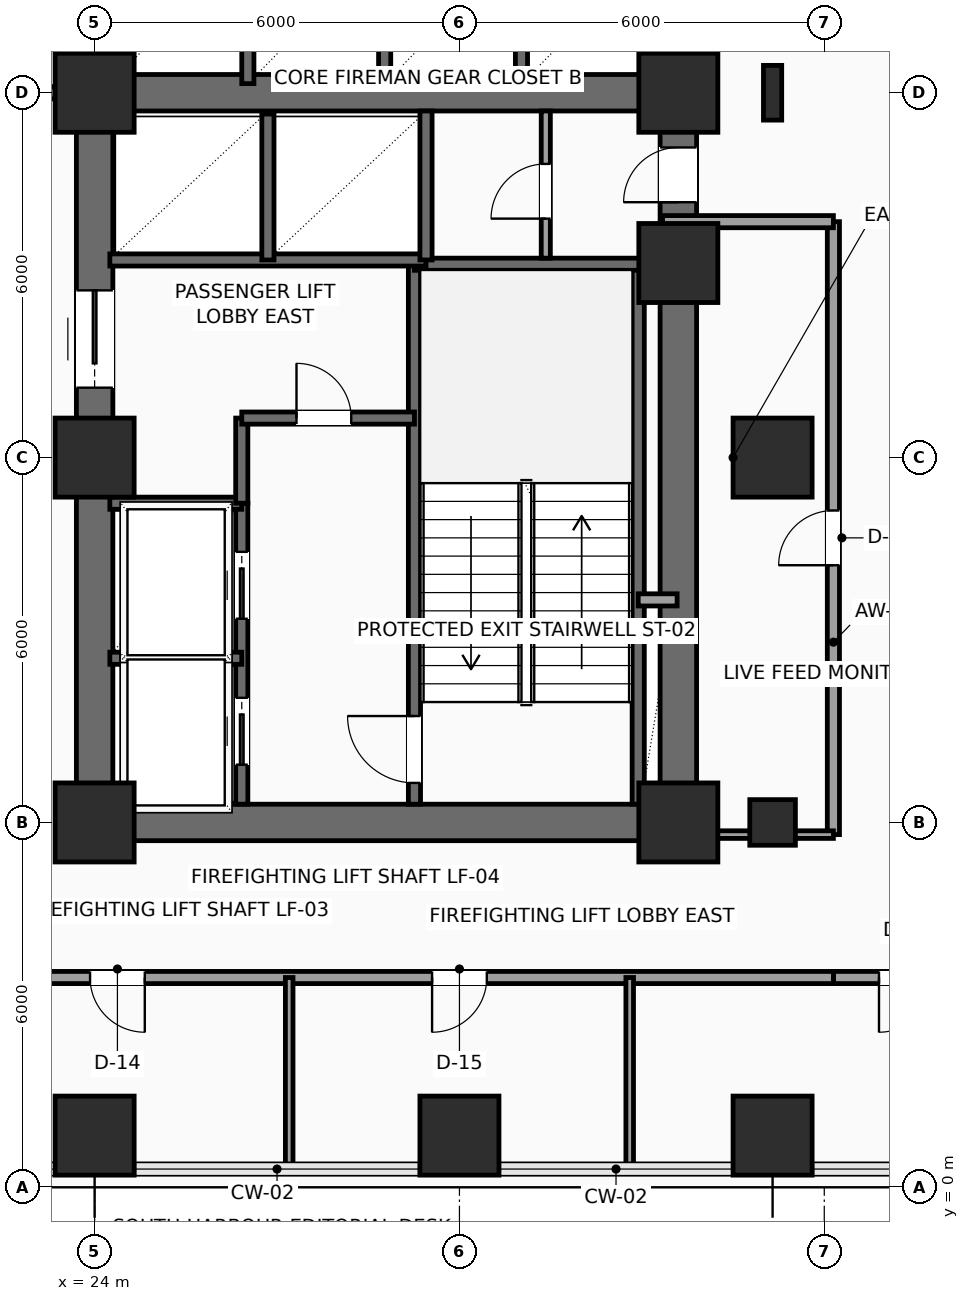
"""IFC4 building model, lengths in metres.
Left out: names, types, materials, properties, quantities, classifications, styles, units other than length and angle.
Written with IfcOpenShell. Run it as: python <this file> out.ifc"""

import sys

from ifc_helpers import new_model, si_unit, direction, frame, frame_2d, origin, origin_2d, place, context, subcontext, project, spatial, rectangle, hollow_rectangle, i_section, extrude, element, fill, save


model = new_model("IFC4")
c1 = context("Model", 3, precision=1e-05, world=origin(), true_north=direction((0.0, 1.0)))
c2 = subcontext(c1, "Body", "Model", "MODEL_VIEW")
j1 = project(units=[si_unit("LENGTHUNIT", "METRE"), si_unit("PLANEANGLEUNIT", "RADIAN")], contexts=[c1])
p1 = place(None, origin())
s1 = spatial("IfcSite", under=j1, at=p1, CompositionType="ELEMENT")
p2 = place(p1, origin())
s2 = spatial("IfcBuilding", under=s1, at=p2, CompositionType="ELEMENT")
p3 = place(p2, frame((0.0, 0.0, 51.9)))
s3 = spatial("IfcBuildingStorey", under=s2, at=p3, CompositionType="ELEMENT", Elevation=51.9)
for number, where, z_axis, x_axis in (
    (1, (24.0, 6.0, 0.0), (0.0, 0.0, 1.0), (1.0, 0.0, 0.0)),
    (2, (24.0, 12.0, 0.0), (0.0, 0.0, 1.0), (1.0, 0.0, 0.0)),
    (3, (24.0, 18.0, 0.0), (0.0, 0.0, 1.0), (1.0, 0.0, 0.0)),
    (4, (33.6, 6.0, 0.0), (0.0, 0.0, 1.0), (1.0, 0.0, 0.0)),
    (5, (33.6, 15.2, 0.0), (0.0, 0.0, 1.0), (1.0, 0.0, 0.0)),
    (6, (33.6, 18.0, 0.0), (0.0, 0.0, 1.0), (1.0, 0.0, 0.0)),
    (7, (24.0, 0.85, 0.0), (0.0, 0.0, 1.0), (1.0, 0.0, 0.0)),
    (8, (30.0, 0.85, 0.0), (0.0, 0.0, 1.0), (1.0, 0.0, 0.0)),
    (9, (35.15, 0.85, 0.0), (0.0, 0.0, 1.0), (1.0, 0.0, 0.0)),
):
    element("IfcColumn", number, at=place(p3, frame(where, z_axis=z_axis, x_axis=x_axis)), inside=s3, PredefinedType="COLUMN", context=c2, shape_type="SweptSolid", body=[
        extrude(rectangle(XDim=1.3, YDim=1.3, at=origin_2d()), origin(), (0.0, 0.0, 1.0), 3.9),
    ])
p4 = place(p3, frame((35.15, 6.0, 0.0), z_axis=(0.0, 0.0, 1.0), x_axis=(1.0, 0.0, 0.0)))
e10 = element("IfcColumn", 10, at=p4, inside=s3, PredefinedType="COLUMN", context=c2, shape_type="SweptSolid", body=[
    extrude(hollow_rectangle(XDim=0.75, YDim=0.75, WallThickness=0.035, InnerFilletRadius=0.035, OuterFilletRadius=0.05, at=origin_2d()), origin(), (0.0, 0.0, 1.0), 3.9),
])
p5 = place(p3, frame((35.15, 12.0, 0.0), z_axis=(0.0, 0.0, 1.0), x_axis=(1.0, 0.0, 0.0)))
e11 = element("IfcColumn", 11, at=p5, inside=s3, PredefinedType="COLUMN", context=c2, shape_type="SweptSolid", body=[
    extrude(rectangle(XDim=1.3, YDim=1.3, at=origin_2d()), origin(), (0.0, 0.0, 1.0), 3.9),
])
p6 = place(p3, frame((35.15, 18.0, 0.0), z_axis=(0.0, 0.0, 1.0), x_axis=(1.0, 0.0, 0.0)))
e12 = element("IfcColumn", 12, at=p6, inside=s3, PredefinedType="COLUMN", context=c2, shape_type="SweptSolid", body=[
    extrude(i_section(OverallWidth=0.3, OverallDepth=0.9, WebThickness=0.019, FlangeThickness=0.035, FilletRadius=0.03, at=origin_2d()), origin(), (0.0, 0.0, 1.0), 3.9),
])
for number, where, z_axis, x_axis in (
    (13, (24.0, 6.0, 0.0), (0.0, 0.0, 1.0), (1.0, 0.0, 0.0)),
    (14, (24.0, 18.0, 0.0), (0.0, 0.0, 1.0), (1.0, 0.0, 0.0)),
):
    element("IfcWall", number, at=place(p3, frame(where, z_axis=z_axis, x_axis=x_axis)), inside=s3, PredefinedType="SHEAR", context=c2, shape_type="SweptSolid", body=[
        extrude(rectangle(XDim=9.6, YDim=0.6, at=frame_2d((4.8, 0.0))), origin(), (0.0, 0.0, 1.0), 3.65),
    ])
p7 = place(p3, frame((24.0, 6.0, 0.0), z_axis=(0.0, 0.0, 1.0), x_axis=(0.0, 1.0, 0.0)))
e15 = element("IfcWall", 15, at=p7, inside=s3, PredefinedType="SHEAR", context=c2, shape_type="SweptSolid", body=[
    extrude(rectangle(XDim=12.0, YDim=0.6, at=frame_2d((6.0, 0.0))), origin(), (0.0, 0.0, 1.0), 3.65),
])
p8 = place(p7, frame((7.15, 0.0, 0.0)))
e16 = element("IfcOpeningElement", 16, at=p8, cuts=e15, PredefinedType="OPENING", context=c2, shape_type="SweptSolid", body=[
    extrude(rectangle(XDim=1.6, YDim=2.3, at=frame_2d((0.8, 1.15))), frame((0.0, 0.31, 0.0), z_axis=(0.0, -1.0, 0.0), x_axis=(1.0, 0.0, 0.0)), (0.0, 0.0, 1.0), 0.62),
])
p9 = place(p3, frame((33.6, 6.0, 0.0), z_axis=(0.0, 0.0, 1.0), x_axis=(0.0, 1.0, 0.0)))
e17 = element("IfcWall", 17, at=p9, inside=s3, PredefinedType="SHEAR", context=c2, shape_type="SweptSolid", body=[
    extrude(rectangle(XDim=12.0, YDim=0.6, at=frame_2d((6.0, 0.0))), origin(), (0.0, 0.0, 1.0), 3.65),
])
p10 = place(p9, frame((10.2, 0.0, 0.0)))
e18 = element("IfcOpeningElement", 18, at=p10, cuts=e17, PredefinedType="OPENING", context=c2, shape_type="SweptSolid", body=[
    extrude(rectangle(XDim=0.9, YDim=2.15, at=frame_2d((0.45, 1.075))), frame((0.0, 0.31, 0.0), z_axis=(0.0, -1.0, 0.0), x_axis=(1.0, 0.0, 0.0)), (0.0, 0.0, 1.0), 0.62),
])
p11 = place(p3, frame((29.26, 6.3, 0.0), z_axis=(0.0, 0.0, 1.0), x_axis=(0.0, 1.0, 0.0)))
e19 = element("IfcWall", 19, at=p11, inside=s3, PredefinedType="SHEAR", context=c2, shape_type="SweptSolid", body=[
    extrude(rectangle(XDim=8.88, YDim=0.2, at=frame_2d((4.44, 0.0))), origin(), (0.0, 0.0, 1.0), 3.65),
])
p12 = place(p11, frame((0.35, 0.0, 0.0)))
e20 = element("IfcOpeningElement", 20, at=p12, cuts=e19, PredefinedType="OPENING", context=c2, shape_type="SweptSolid", body=[
    extrude(rectangle(XDim=1.1, YDim=2.2, at=frame_2d((0.55, 1.1))), frame((0.0, 0.11, 0.0), z_axis=(0.0, -1.0, 0.0), x_axis=(1.0, 0.0, 0.0)), (0.0, 0.0, 1.0), 0.22),
])
p13 = place(p3, frame((32.94, 6.3, 0.0), z_axis=(0.0, 0.0, 1.0), x_axis=(0.0, 1.0, 0.0)))
e21 = element("IfcWall", 21, at=p13, inside=s3, PredefinedType="SHEAR", context=c2, shape_type="SweptSolid", body=[
    extrude(rectangle(XDim=8.88, YDim=0.2, at=frame_2d((4.44, 0.0))), origin(), (0.0, 0.0, 1.0), 3.65),
])
p14 = place(p3, frame((29.26, 15.18, 0.0), z_axis=(0.0, 0.0, 1.0), x_axis=(1.0, 0.0, 0.0)))
e22 = element("IfcWall", 22, at=p14, inside=s3, PredefinedType="SHEAR", context=c2, shape_type="SweptSolid", body=[
    extrude(rectangle(XDim=4.04, YDim=0.2, at=frame_2d((2.02, 0.0))), origin(), (0.0, 0.0, 1.0), 3.65),
])
p15 = place(p3, frame((26.42, 6.3, 0.0), z_axis=(0.0, 0.0, 1.0), x_axis=(0.0, 1.0, 0.0)))
e23 = element("IfcWall", 23, at=p15, inside=s3, PredefinedType="SHEAR", context=c2, shape_type="SweptSolid", body=[
    extrude(rectangle(XDim=4.95, YDim=0.2, at=frame_2d((2.475, 0.0))), origin(), (0.0, 0.0, 1.0), 3.65),
])
p16 = place(p15, frame((0.65, 0.0, 0.0)))
e24 = element("IfcOpeningElement", 24, at=p16, cuts=e23, PredefinedType="OPENING", context=c2, shape_type="SweptSolid", body=[
    extrude(rectangle(XDim=1.1, YDim=2.2, at=frame_2d((0.55, 1.1))), frame((0.0, 0.11, 0.0), z_axis=(0.0, -1.0, 0.0), x_axis=(1.0, 0.0, 0.0)), (0.0, 0.0, 1.0), 0.22),
])
p17 = place(p15, frame((3.05, 0.0, 0.0)))
e25 = element("IfcOpeningElement", 25, at=p17, cuts=e23, PredefinedType="OPENING", context=c2, shape_type="SweptSolid", body=[
    extrude(rectangle(XDim=1.1, YDim=2.2, at=frame_2d((0.55, 1.1))), frame((0.0, 0.11, 0.0), z_axis=(0.0, -1.0, 0.0), x_axis=(1.0, 0.0, 0.0)), (0.0, 0.0, 1.0), 0.22),
])
for number, where, z_axis, x_axis in (
    (26, (24.25, 8.7, 0.0), (0.0, 0.0, 1.0), (1.0, 0.0, 0.0)),
    (27, (24.25, 11.25, 0.0), (0.0, 0.0, 1.0), (1.0, 0.0, 0.0)),
):
    element("IfcWall", number, at=place(p3, frame(where, z_axis=z_axis, x_axis=x_axis)), inside=s3, PredefinedType="SHEAR", context=c2, shape_type="SweptSolid", body=[
        extrude(rectangle(XDim=2.17, YDim=0.2, at=frame_2d((1.085, 0.0))), origin(), (0.0, 0.0, 1.0), 3.65),
    ])
p18 = place(p3, frame((26.42, 11.25, 0.0), z_axis=(0.0, 0.0, 1.0), x_axis=(0.0, 1.0, 0.0)))
e28 = element("IfcWall", 28, at=p18, inside=s3, PredefinedType="SHEAR", context=c2, shape_type="SweptSolid", body=[
    extrude(rectangle(XDim=1.4, YDim=0.2, at=frame_2d((0.7, 0.0))), origin(), (0.0, 0.0, 1.0), 3.65),
])
p19 = place(p3, frame((26.42, 12.65, 0.0), z_axis=(0.0, 0.0, 1.0), x_axis=(1.0, 0.0, 0.0)))
e29 = element("IfcWall", 29, at=p19, inside=s3, PredefinedType="SHEAR", context=c2, shape_type="SweptSolid", body=[
    extrude(rectangle(XDim=2.84, YDim=0.2, at=frame_2d((1.42, 0.0))), origin(), (0.0, 0.0, 1.0), 3.65),
])
p20 = place(p19, frame((0.9, 0.0, 0.0)))
e30 = element("IfcOpeningElement", 30, at=p20, cuts=e29, PredefinedType="OPENING", context=c2, shape_type="SweptSolid", body=[
    extrude(rectangle(XDim=0.9, YDim=2.15, at=frame_2d((0.45, 1.075))), frame((0.0, 0.11, 0.0), z_axis=(0.0, -1.0, 0.0), x_axis=(1.0, 0.0, 0.0)), (0.0, 0.0, 1.0), 0.22),
])
p21 = place(p3, frame((32.94, 9.66, 0.0), z_axis=(0.0, 0.0, 1.0), x_axis=(1.0, 0.0, 0.0)))
e31 = element("IfcWall", 31, at=p21, inside=s3, PredefinedType="SOLIDWALL", context=c2, shape_type="SweptSolid", body=[
    extrude(rectangle(XDim=0.64, YDim=0.2, at=frame_2d((0.32, 0.0))), origin(), (0.0, 0.0, 1.0), 3.65),
])
p22 = place(p3, frame((24.25, 15.25, 0.0), z_axis=(0.0, 0.0, 1.0), x_axis=(1.0, 0.0, 0.0)))
e32 = element("IfcWall", 32, at=p22, inside=s3, PredefinedType="SHEAR", context=c2, shape_type="SweptSolid", body=[
    extrude(rectangle(XDim=5.2, YDim=0.2, at=frame_2d((2.6, 0.0))), origin(), (0.0, 0.0, 1.0), 3.65),
])
p23 = place(p3, frame((26.85, 15.25, 0.0), z_axis=(0.0, 0.0, 1.0), x_axis=(0.0, 1.0, 0.0)))
e33 = element("IfcWall", 33, at=p23, inside=s3, PredefinedType="SHEAR", context=c2, shape_type="SweptSolid", body=[
    extrude(rectangle(XDim=2.4, YDim=0.2, at=frame_2d((1.2, 0.0))), origin(), (0.0, 0.0, 1.0), 3.65),
])
p24 = place(p3, frame((29.45, 15.25, 0.0), z_axis=(0.0, 0.0, 1.0), x_axis=(0.0, 1.0, 0.0)))
e34 = element("IfcWall", 34, at=p24, inside=s3, PredefinedType="SHEAR", context=c2, shape_type="SweptSolid", body=[
    extrude(rectangle(XDim=2.45, YDim=0.2, at=frame_2d((1.225, 0.0))), origin(), (0.0, 0.0, 1.0), 3.65),
])
p25 = place(p3, frame((31.42, 15.28, 0.0), z_axis=(0.0, 0.0, 1.0), x_axis=(0.0, 1.0, 0.0)))
e35 = element("IfcWall", 35, at=p25, inside=s3, PredefinedType="PARTITIONING", context=c2, shape_type="SweptSolid", body=[
    extrude(rectangle(XDim=2.42, YDim=0.15, at=frame_2d((1.21, 0.0))), origin(), (0.0, 0.0, 1.0), 3.65),
])
p26 = place(p25, frame((0.65, 0.0, 0.0)))
e36 = element("IfcOpeningElement", 36, at=p26, cuts=e35, PredefinedType="OPENING", context=c2, shape_type="SweptSolid", body=[
    extrude(rectangle(XDim=0.9, YDim=2.15, at=frame_2d((0.45, 1.075))), frame((0.0, 0.085, 0.0), z_axis=(0.0, -1.0, 0.0), x_axis=(1.0, 0.0, 0.0)), (0.0, 0.0, 1.0), 0.17),
])
p27 = place(p3, frame((20.45, 18.0, 0.0), z_axis=(0.0, 0.0, 1.0), x_axis=(1.0, 0.0, 0.0)))
e37 = element("IfcWall", 37, at=p27, inside=s3, PredefinedType="SHEAR", context=c2, shape_type="SweptSolid", body=[
    extrude(rectangle(XDim=3.5, YDim=0.2, at=frame_2d((1.75, 0.0))), origin(), (0.0, 0.0, 1.0), 3.65),
])
p28 = place(p27, frame((0.95, 0.0, 0.0)))
e38 = element("IfcOpeningElement", 38, at=p28, cuts=e37, PredefinedType="OPENING", context=c2, shape_type="SweptSolid", body=[
    extrude(rectangle(XDim=1.6, YDim=2.3, at=frame_2d((0.8, 1.15))), frame((0.0, 0.11, 0.0), z_axis=(0.0, -1.0, 0.0), x_axis=(1.0, 0.0, 0.0)), (0.0, 0.0, 1.0), 0.22),
])
p29 = place(p3, frame((23.95, 18.0, 0.0), z_axis=(0.0, 0.0, 1.0), x_axis=(0.0, 1.0, 0.0)))
e39 = element("IfcWall", 39, at=p29, inside=s3, PredefinedType="SHEAR", context=c2, shape_type="SweptSolid", body=[
    extrude(rectangle(XDim=9.3, YDim=0.2, at=frame_2d((4.65, 0.0))), origin(), (0.0, 0.0, 1.0), 3.65),
])
for number, where, z_axis, x_axis in (
    (40, (33.3, 18.1, 0.0), (0.0, 0.0, 1.0), (0.0, 1.0, 0.0)),
    (41, (24.25, 18.1, 0.0), (0.0, 0.0, 1.0), (0.0, 1.0, 0.0)),
):
    element("IfcWall", number, at=place(p3, frame(where, z_axis=z_axis, x_axis=x_axis)), inside=s3, PredefinedType="SHEAR", context=c2, shape_type="SweptSolid", body=[
        extrude(rectangle(XDim=2.35, YDim=0.2, at=frame_2d((1.175, 0.0))), origin(), (0.0, 0.0, 1.0), 3.65),
    ])
for number, where, z_axis, x_axis in (
    (42, (26.52, 18.15, 0.0), (0.0, 0.0, 1.0), (0.0, 1.0, 0.0)),
    (43, (28.77, 18.15, 0.0), (0.0, 0.0, 1.0), (0.0, 1.0, 0.0)),
    (44, (31.02, 18.15, 0.0), (0.0, 0.0, 1.0), (0.0, 1.0, 0.0)),
):
    element("IfcWall", number, at=place(p3, frame(where, z_axis=z_axis, x_axis=x_axis)), inside=s3, PredefinedType="SHEAR", context=c2, shape_type="SweptSolid", body=[
        extrude(rectangle(XDim=2.3, YDim=0.2, at=frame_2d((1.15, 0.0))), origin(), (0.0, 0.0, 1.0), 3.65),
    ])
p30 = place(p3, frame((36.15, 5.8, 0.0), z_axis=(0.0, 0.0, 1.0), x_axis=(0.0, 1.0, 0.0)))
e45 = element("IfcWall", 45, at=p30, inside=s3, PredefinedType="PARTITIONING", context=c2, shape_type="SweptSolid", body=[
    extrude(rectangle(XDim=10.08, YDim=0.2, at=frame_2d((5.04, 0.0))), origin(), (0.0, 0.0, 1.0), 3.65),
])
p31 = place(p30, frame((4.43, 0.0, 0.0)))
e46 = element("IfcOpeningElement", 46, at=p31, cuts=e45, PredefinedType="OPENING", context=c2, shape_type="SweptSolid", body=[
    extrude(rectangle(XDim=0.9, YDim=2.1, at=frame_2d((0.45, 1.05))), frame((0.0, 0.11, 0.0), z_axis=(0.0, -1.0, 0.0), x_axis=(1.0, 0.0, 0.0)), (0.0, 0.0, 1.0), 0.22),
])
p32 = place(p3, frame((36.15, 15.88, 0.0), z_axis=(0.0, 0.0, 1.0), x_axis=(-1.0, 0.0, 0.0)))
e47 = element("IfcWall", 47, at=p32, inside=s3, PredefinedType="PARTITIONING", context=c2, shape_type="SweptSolid", body=[
    extrude(rectangle(XDim=2.81, YDim=0.2, at=frame_2d((1.405, 0.0))), origin(), (0.0, 0.0, 1.0), 3.65),
])
p33 = place(p3, frame((38.55, 3.45, 0.0), z_axis=(0.0, 0.0, 1.0), x_axis=(-1.0, 0.0, 0.0)))
e48 = element("IfcWall", 48, at=p33, inside=s3, PredefinedType="PARTITIONING", context=c2, shape_type="SweptSolid", body=[
    extrude(rectangle(XDim=2.4, YDim=0.2, at=frame_2d((1.2, 0.0))), origin(), (0.0, 0.0, 1.0), 3.142),
])
p34 = place(p33, frame((0.75, 0.0, 0.0)))
e49 = element("IfcOpeningElement", 49, at=p34, cuts=e48, PredefinedType="OPENING", context=c2, shape_type="SweptSolid", body=[
    extrude(rectangle(XDim=0.9, YDim=2.1, at=frame_2d((0.45, 1.05))), frame((0.0, 0.11, 0.0), z_axis=(0.0, -1.0, 0.0), x_axis=(1.0, 0.0, 0.0)), (0.0, 0.0, 1.0), 0.22),
])
p35 = place(p3, frame((36.15, 3.45, 0.0), z_axis=(0.0, 0.0, 1.0), x_axis=(-1.0, 0.0, 0.0)))
e50 = element("IfcWall", 50, at=p35, inside=s3, PredefinedType="PARTITIONING", context=c2, shape_type="SweptSolid", body=[
    extrude(rectangle(XDim=14.6, YDim=0.2, at=frame_2d((7.3, 0.0))), origin(), (0.0, 0.0, 1.0), 3.142),
])
p36 = place(p35, frame((11.325, 0.0, 0.0)))
e51 = element("IfcOpeningElement", 51, at=p36, cuts=e50, PredefinedType="OPENING", context=c2, shape_type="SweptSolid", body=[
    extrude(rectangle(XDim=0.9, YDim=2.1, at=frame_2d((0.45, 1.05))), frame((0.0, 0.11, 0.0), z_axis=(0.0, -1.0, 0.0), x_axis=(1.0, 0.0, 0.0)), (0.0, 0.0, 1.0), 0.22),
])
p37 = place(p35, frame((5.7, 0.0, 0.0)))
e52 = element("IfcOpeningElement", 52, at=p37, cuts=e50, PredefinedType="OPENING", context=c2, shape_type="SweptSolid", body=[
    extrude(rectangle(XDim=0.9, YDim=2.1, at=frame_2d((0.45, 1.05))), frame((0.0, 0.11, 0.0), z_axis=(0.0, -1.0, 0.0), x_axis=(1.0, 0.0, 0.0)), (0.0, 0.0, 1.0), 0.22),
])
for number, where, z_axis, x_axis in (
    (53, (27.2, 0.3, 0.0), (0.0, 0.0, 1.0), (0.0, 1.0, 0.0)),
    (54, (32.8, 0.3, 0.0), (0.0, 0.0, 1.0), (0.0, 1.0, 0.0)),
):
    element("IfcWall", number, at=place(p3, frame(where, z_axis=z_axis, x_axis=x_axis)), inside=s3, PredefinedType="PARTITIONING", context=c2, shape_type="SweptSolid", body=[
        extrude(rectangle(XDim=3.15, YDim=0.125, at=frame_2d((1.575, 0.0))), origin(), (0.0, 0.0, 1.0), 3.65),
    ])
p38 = place(p3, frame((33.65, 5.8, 0.0), z_axis=(0.0, 0.0, 1.0), x_axis=(1.0, 0.0, 0.0)))
e55 = element("IfcWall", 55, at=p38, inside=s3, PredefinedType="PARTITIONING", context=c2, shape_type="SweptSolid", body=[
    extrude(rectangle(XDim=2.5, YDim=0.125, at=frame_2d((1.25, 0.0))), origin(), (0.0, 0.0, 1.0), 2.992),
])
p39 = place(p8, origin())
e56 = element("IfcDoor", 56, at=p39, inside=s3, OperationType="DOUBLE_DOOR_SLIDING", PredefinedType="DOOR", context=c2, shape_type="SweptSolid", body=[
    extrude(rectangle(XDim=1.6, YDim=2.3, at=frame_2d((0.8, 1.15))), frame((0.0, 0.025, 0.0), z_axis=(0.0, -1.0, 0.0), x_axis=(1.0, 0.0, 0.0)), (0.0, 0.0, 1.0), 0.05),
])
fill(e16, e56)
p40 = place(p10, origin())
e57 = element("IfcDoor", 57, at=p40, inside=s3, OperationType="SINGLE_SWING_LEFT", PredefinedType="DOOR", context=c2, shape_type="SweptSolid", body=[
    extrude(rectangle(XDim=0.9, YDim=2.15, at=frame_2d((0.45, 1.075))), frame((0.0, 0.025, 0.0), z_axis=(0.0, -1.0, 0.0), x_axis=(1.0, 0.0, 0.0)), (0.0, 0.0, 1.0), 0.05),
])
fill(e18, e57)
p41 = place(p12, origin())
e58 = element("IfcDoor", 58, at=p41, inside=s3, OperationType="SINGLE_SWING_RIGHT", PredefinedType="DOOR", context=c2, shape_type="SweptSolid", body=[
    extrude(rectangle(XDim=1.1, YDim=2.2, at=frame_2d((0.55, 1.1))), frame((0.0, 0.025, 0.0), z_axis=(0.0, -1.0, 0.0), x_axis=(1.0, 0.0, 0.0)), (0.0, 0.0, 1.0), 0.05),
])
fill(e20, e58)
p42 = place(p16, origin())
e59 = element("IfcDoor", 59, at=p42, inside=s3, OperationType="SLIDING_TO_LEFT", PredefinedType="DOOR", context=c2, shape_type="SweptSolid", body=[
    extrude(rectangle(XDim=1.1, YDim=2.2, at=frame_2d((0.55, 1.1))), frame((0.0, 0.025, 0.0), z_axis=(0.0, -1.0, 0.0), x_axis=(1.0, 0.0, 0.0)), (0.0, 0.0, 1.0), 0.05),
])
fill(e24, e59)
p43 = place(p17, origin())
e60 = element("IfcDoor", 60, at=p43, inside=s3, OperationType="SLIDING_TO_LEFT", PredefinedType="DOOR", context=c2, shape_type="SweptSolid", body=[
    extrude(rectangle(XDim=1.1, YDim=2.2, at=frame_2d((0.55, 1.1))), frame((0.0, 0.025, 0.0), z_axis=(0.0, -1.0, 0.0), x_axis=(1.0, 0.0, 0.0)), (0.0, 0.0, 1.0), 0.05),
])
fill(e25, e60)
p44 = place(p20, origin())
e61 = element("IfcDoor", 61, at=p44, inside=s3, OperationType="SINGLE_SWING_LEFT", PredefinedType="DOOR", context=c2, shape_type="SweptSolid", body=[
    extrude(rectangle(XDim=0.9, YDim=2.15, at=frame_2d((0.45, 1.075))), frame((0.0, 0.025, 0.0), z_axis=(0.0, -1.0, 0.0), x_axis=(1.0, 0.0, 0.0)), (0.0, 0.0, 1.0), 0.05),
])
fill(e30, e61)
p45 = place(p26, origin())
e62 = element("IfcDoor", 62, at=p45, inside=s3, OperationType="SINGLE_SWING_LEFT", PredefinedType="DOOR", context=c2, shape_type="SweptSolid", body=[
    extrude(rectangle(XDim=0.9, YDim=2.15, at=frame_2d((0.45, 1.075))), frame((0.0, 0.025, 0.0), z_axis=(0.0, -1.0, 0.0), x_axis=(1.0, 0.0, 0.0)), (0.0, 0.0, 1.0), 0.05),
])
fill(e36, e62)
p46 = place(p31, origin())
e63 = element("IfcDoor", 63, at=p46, inside=s3, OperationType="SINGLE_SWING_LEFT", PredefinedType="DOOR", context=c2, shape_type="SweptSolid", body=[
    extrude(rectangle(XDim=0.9, YDim=2.1, at=frame_2d((0.45, 1.05))), frame((0.0, 0.025, 0.0), z_axis=(0.0, -1.0, 0.0), x_axis=(1.0, 0.0, 0.0)), (0.0, 0.0, 1.0), 0.05),
])
fill(e46, e63)
p47 = place(p34, origin())
e64 = element("IfcDoor", 64, at=p47, inside=s3, OperationType="SINGLE_SWING_RIGHT", PredefinedType="DOOR", context=c2, shape_type="SweptSolid", body=[
    extrude(rectangle(XDim=0.9, YDim=2.1, at=frame_2d((0.45, 1.05))), frame((0.0, 0.025, 0.0), z_axis=(0.0, -1.0, 0.0), x_axis=(1.0, 0.0, 0.0)), (0.0, 0.0, 1.0), 0.05),
])
fill(e49, e64)
p48 = place(p36, origin())
e65 = element("IfcDoor", 65, at=p48, inside=s3, OperationType="SINGLE_SWING_LEFT", PredefinedType="DOOR", context=c2, shape_type="SweptSolid", body=[
    extrude(rectangle(XDim=0.9, YDim=2.1, at=frame_2d((0.45, 1.05))), frame((0.0, 0.025, 0.0), z_axis=(0.0, -1.0, 0.0), x_axis=(1.0, 0.0, 0.0)), (0.0, 0.0, 1.0), 0.05),
])
fill(e51, e65)
p49 = place(p37, origin())
e66 = element("IfcDoor", 66, at=p49, inside=s3, OperationType="SINGLE_SWING_RIGHT", PredefinedType="DOOR", context=c2, shape_type="SweptSolid", body=[
    extrude(rectangle(XDim=0.9, YDim=2.1, at=frame_2d((0.45, 1.05))), frame((0.0, 0.025, 0.0), z_axis=(0.0, -1.0, 0.0), x_axis=(1.0, 0.0, 0.0)), (0.0, 0.0, 1.0), 0.05),
])
fill(e52, e66)
save(model, sys.argv[1])
